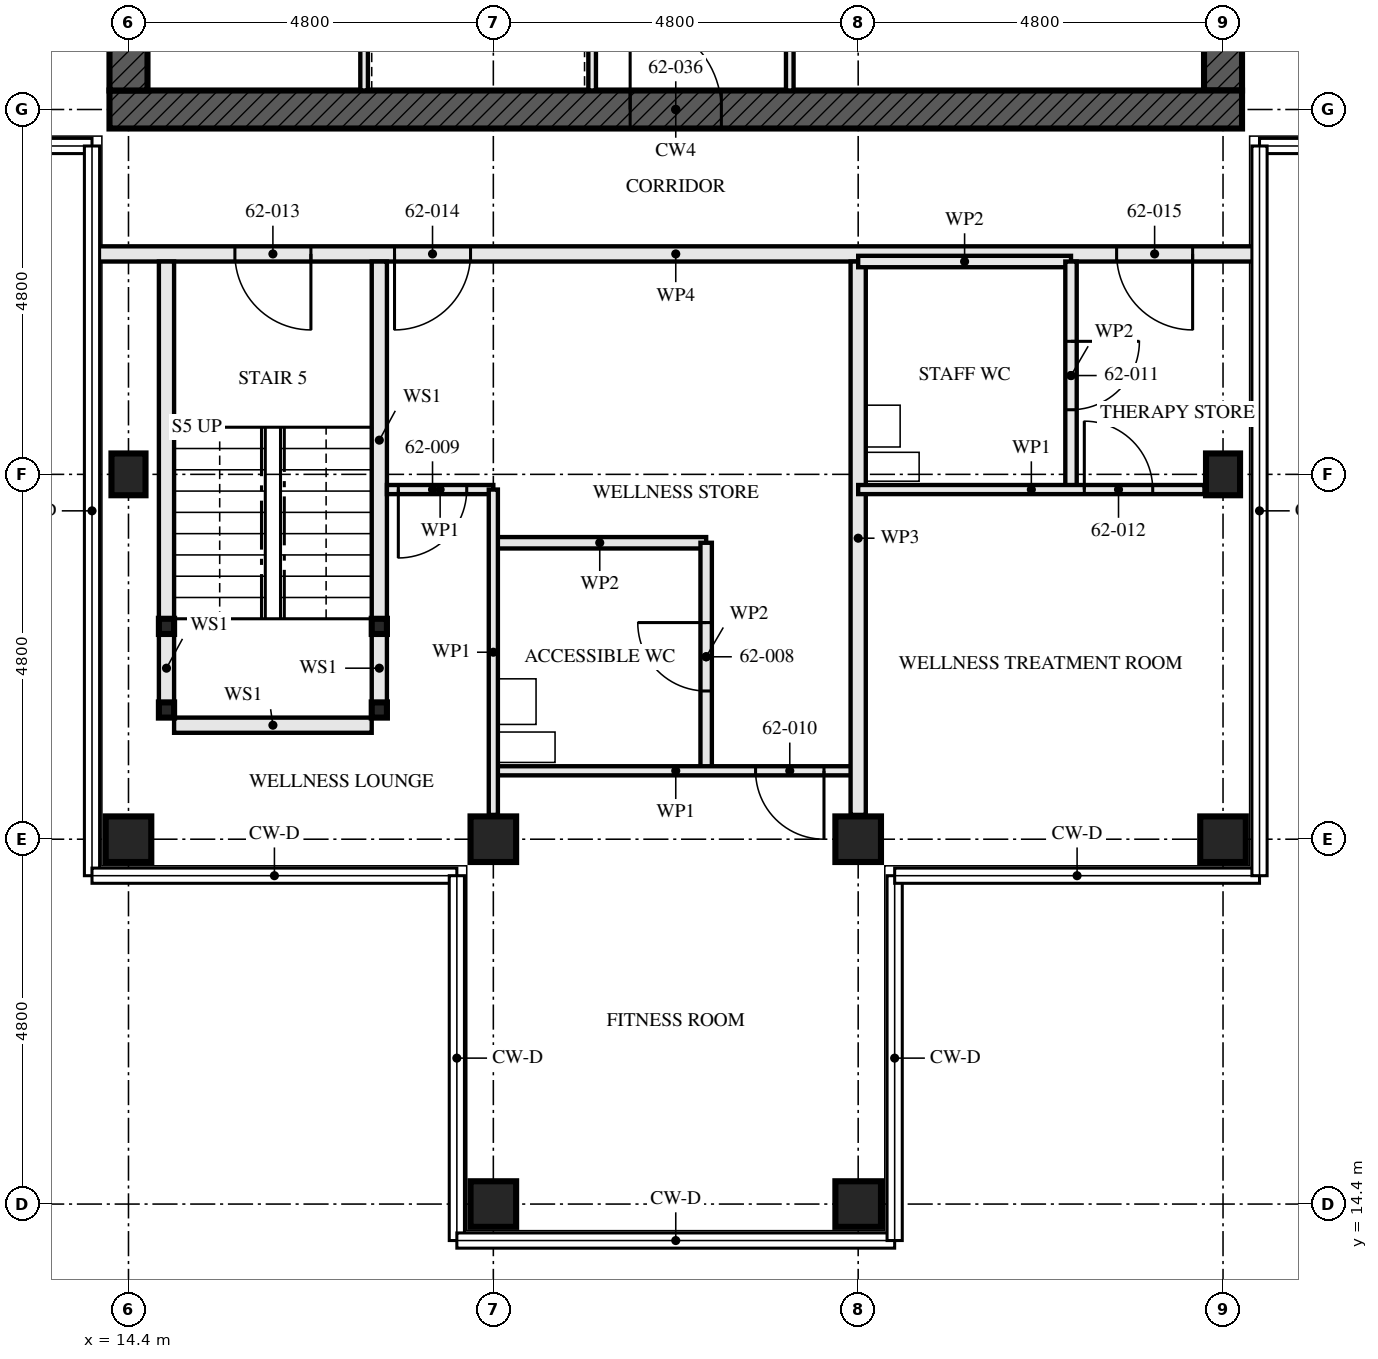
"""IFC4 building model, lengths in metres.
Left out: names, types, materials, properties, quantities, classifications, styles, units other than length and angle.
Written with IfcOpenShell. Run it as: python <this file> out.ifc"""

import sys

from ifc_helpers import new_model, si_unit, direction, frame, frame_2d, origin, origin_2d, place, context, subcontext, project, spatial, rectangle, hollow_rectangle, i_section, extrude, element, fill, save


model = new_model("IFC4")
c1 = context("Model", 3, precision=1e-05, world=origin(), true_north=direction((0.0, 1.0)))
c2 = subcontext(c1, "Body", "Model", "MODEL_VIEW")
j1 = project(units=[si_unit("LENGTHUNIT", "METRE"), si_unit("PLANEANGLEUNIT", "RADIAN")], contexts=[c1])
p1 = place(None, origin())
s1 = spatial("IfcSite", under=j1, at=p1, CompositionType="ELEMENT")
p2 = place(p1, origin())
s2 = spatial("IfcBuilding", under=s1, at=p2, CompositionType="ELEMENT")
p3 = place(p2, frame((0.0, 0.0, 226.0)))
s3 = spatial("IfcBuildingStorey", under=s2, at=p3, CompositionType="ELEMENT", Elevation=226.0)
p4 = place(p3, frame((14.4, 19.2, 0.0), z_axis=(0.0, 0.0, 1.0), x_axis=(0.0, 1.0, 0.0)))
e1 = element("IfcColumn", 1, at=p4, inside=s3, PredefinedType="COLUMN", context=c2, shape_type="SweptSolid", body=[
    extrude(hollow_rectangle(XDim=0.6, YDim=0.6, WallThickness=0.05, at=origin_2d()), origin(), (0.0, 0.0, 1.0), 3.5),
])
p5 = place(p3, frame((14.4, 24.0, 0.0), z_axis=(0.0, 0.0, 1.0), x_axis=(1.0, 0.0, 0.0)))
e2 = element("IfcColumn", 2, at=p5, inside=s3, PredefinedType="COLUMN", context=c2, shape_type="SweptSolid", body=[
    extrude(i_section(OverallWidth=0.448, OverallDepth=0.55, WebThickness=0.072, FlangeThickness=0.115, FilletRadius=0.015, at=origin_2d()), origin(), (0.0, 0.0, 1.0), 3.5),
])
for number, where, z_axis, x_axis in (
    (3, (19.2, 14.4, 0.0), (0.0, 0.0, 1.0), (0.0, 1.0, 0.0)),
    (4, (19.2, 19.2, 0.0), (0.0, 0.0, 1.0), (0.0, 1.0, 0.0)),
    (5, (24.0, 14.4, 0.0), (0.0, 0.0, 1.0), (0.0, 1.0, 0.0)),
    (6, (24.0, 19.2, 0.0), (0.0, 0.0, 1.0), (0.0, 1.0, 0.0)),
    (7, (28.8, 19.2, 0.0), (0.0, 0.0, 1.0), (0.0, 1.0, 0.0)),
):
    element("IfcColumn", number, at=place(p3, frame(where, z_axis=z_axis, x_axis=x_axis)), inside=s3, PredefinedType="COLUMN", context=c2, shape_type="SweptSolid", body=[
        extrude(hollow_rectangle(XDim=0.6, YDim=0.6, WallThickness=0.05, at=origin_2d()), origin(), (0.0, 0.0, 1.0), 3.5),
    ])
p6 = place(p3, frame((28.8, 24.0, 0.0), z_axis=(0.0, 0.0, 1.0), x_axis=(1.0, 0.0, 0.0)))
e8 = element("IfcColumn", 8, at=p6, inside=s3, PredefinedType="COLUMN", context=c2, shape_type="SweptSolid", body=[
    extrude(i_section(OverallWidth=0.448, OverallDepth=0.55, WebThickness=0.072, FlangeThickness=0.115, FilletRadius=0.015, at=origin_2d()), origin(), (0.0, 0.0, 1.0), 3.5),
])
p7 = place(p3, frame((14.15, 28.8, -0.17), z_axis=(0.0, 0.0, 1.0), x_axis=(1.0, 0.0, 0.0)))
e9 = element("IfcWall", 9, at=p7, inside=s3, PredefinedType="SHEAR", context=c2, shape_type="SweptSolid", body=[
    extrude(rectangle(XDim=14.9, YDim=0.5, at=frame_2d((7.45, 0.0))), origin(), (0.0, 0.0, 1.0), 3.5),
])
p8 = place(p7, frame((6.85, 0.0, 0.17)))
e10 = element("IfcOpeningElement", 10, at=p8, cuts=e9, PredefinedType="OPENING", context=c2, shape_type="SweptSolid", body=[
    extrude(rectangle(XDim=1.2, YDim=2.1, at=frame_2d((0.6, 1.05))), frame((0.0, 0.26, 0.0), z_axis=(0.0, -1.0, 0.0), x_axis=(1.0, 0.0, 0.0)), (0.0, 0.0, 1.0), 0.521),
])
p9 = place(p3, frame((14.4, 42.95, -0.17), z_axis=(0.0, 0.0, 1.0), x_axis=(0.0, -1.0, 0.0)))
e11 = element("IfcWall", 11, at=p9, inside=s3, PredefinedType="SHEAR", context=c2, shape_type="SweptSolid", body=[
    extrude(rectangle(XDim=13.9, YDim=0.5, at=frame_2d((6.95, 0.0))), origin(), (0.0, 0.0, 1.0), 3.5),
])
p10 = place(p9, frame((6.35, 0.0, 0.17)))
e12 = element("IfcOpeningElement", 12, at=p10, cuts=e11, PredefinedType="OPENING", context=c2, shape_type="SweptSolid", body=[
    extrude(rectangle(XDim=1.2, YDim=2.1, at=frame_2d((0.6, 1.05))), frame((0.0, 0.26, 0.0), z_axis=(0.0, -1.0, 0.0), x_axis=(1.0, 0.0, 0.0)), (0.0, 0.0, 1.0), 0.521),
])
p11 = place(p3, frame((28.8, 29.05, -0.17), z_axis=(0.0, 0.0, 1.0), x_axis=(0.0, 1.0, 0.0)))
e13 = element("IfcWall", 13, at=p11, inside=s3, PredefinedType="SHEAR", context=c2, shape_type="SweptSolid", body=[
    extrude(rectangle(XDim=13.9, YDim=0.5, at=frame_2d((6.95, 0.0))), origin(), (0.0, 0.0, 1.0), 3.5),
])
p12 = place(p11, frame((6.35, 0.0, 0.17)))
e14 = element("IfcOpeningElement", 14, at=p12, cuts=e13, PredefinedType="OPENING", context=c2, shape_type="SweptSolid", body=[
    extrude(rectangle(XDim=1.2, YDim=2.1, at=frame_2d((0.6, 1.05))), frame((0.0, 0.26, 0.0), z_axis=(0.0, -1.0, 0.0), x_axis=(1.0, 0.0, 0.0)), (0.0, 0.0, 1.0), 0.521),
])
for number, where, z_axis, x_axis in (
    (15, (14.9, 20.9, 0.0), (0.0, 0.0, 1.0), (1.0, 0.0, 0.0)),
    (16, (17.7, 20.9, 0.0), (0.0, 0.0, 1.0), (1.0, 0.0, 0.0)),
    (17, (14.9, 22.0, 0.0), (0.0, 0.0, 1.0), (1.0, 0.0, 0.0)),
    (18, (17.7, 22.0, 0.0), (0.0, 0.0, 1.0), (1.0, 0.0, 0.0)),
):
    element("IfcColumn", number, at=place(p3, frame(where, z_axis=z_axis, x_axis=x_axis)), inside=s3, PredefinedType="COLUMN", context=c2, shape_type="SweptSolid", body=[
        extrude(hollow_rectangle(XDim=0.2, YDim=0.2, WallThickness=0.008, at=origin_2d()), origin(), (0.0, 0.0, 1.0), 3.33),
    ])
p13 = place(p3, frame((14.9, 21.0, 0.0), z_axis=(0.0, 0.0, 1.0), x_axis=(0.0, 1.0, 0.0)))
e19 = element("IfcWall", 19, at=p13, inside=s3, PredefinedType="SOLIDWALL", context=c2, shape_type="SweptSolid", body=[
    extrude(rectangle(XDim=0.9, YDim=0.2, at=frame_2d((0.45, 0.0))), origin(), (0.0, 0.0, 1.0), 2.99),
])
p14 = place(p3, frame((14.9, 22.1, 0.0), z_axis=(0.0, 0.0, 1.0), x_axis=(0.0, 1.0, 0.0)))
e20 = element("IfcWall", 20, at=p14, inside=s3, PredefinedType="SOLIDWALL", context=c2, shape_type="SweptSolid", body=[
    extrude(rectangle(XDim=4.7, YDim=0.2, at=frame_2d((2.35, 0.0))), origin(), (0.0, 0.0, 1.0), 2.99),
])
p15 = place(p3, frame((17.7, 21.0, 0.0), z_axis=(0.0, 0.0, 1.0), x_axis=(0.0, 1.0, 0.0)))
e21 = element("IfcWall", 21, at=p15, inside=s3, PredefinedType="SOLIDWALL", context=c2, shape_type="SweptSolid", body=[
    extrude(rectangle(XDim=0.9, YDim=0.2, at=frame_2d((0.45, 0.0))), origin(), (0.0, 0.0, 1.0), 2.99),
])
p16 = place(p3, frame((17.7, 22.1, 0.0), z_axis=(0.0, 0.0, 1.0), x_axis=(0.0, 1.0, 0.0)))
e22 = element("IfcWall", 22, at=p16, inside=s3, PredefinedType="SOLIDWALL", context=c2, shape_type="SweptSolid", body=[
    extrude(rectangle(XDim=4.7, YDim=0.2, at=frame_2d((2.35, 0.0))), origin(), (0.0, 0.0, 1.0), 2.99),
])
p17 = place(p3, frame((15.0, 20.7, 0.0), z_axis=(0.0, 0.0, 1.0), x_axis=(1.0, 0.0, 0.0)))
e23 = element("IfcWall", 23, at=p17, inside=s3, PredefinedType="SOLIDWALL", context=c2, shape_type="SweptSolid", body=[
    extrude(rectangle(XDim=2.6, YDim=0.2, at=frame_2d((1.3, 0.0))), origin(), (0.0, 0.0, 1.0), 3.33),
])
p18 = place(p3, frame((22.0, 20.1, 0.0), z_axis=(0.0, 0.0, 1.0), x_axis=(0.0, 1.0, 0.0)))
e24 = element("IfcWall", 24, at=p18, inside=s3, PredefinedType="PARTITIONING", context=c2, shape_type="SweptSolid", body=[
    extrude(rectangle(XDim=3.0, YDim=0.15, at=frame_2d((1.5, 0.0))), origin(), (0.0, 0.0, 1.0), 3.33),
])
p19 = place(p18, frame((1.05, 0.0, 0.0)))
e25 = element("IfcOpeningElement", 25, at=p19, cuts=e24, PredefinedType="OPENING", context=c2, shape_type="SweptSolid", body=[
    extrude(rectangle(XDim=0.9, YDim=2.1, at=frame_2d((0.45, 1.05))), frame((0.0, 0.085, 0.0), z_axis=(0.0, -1.0, 0.0), x_axis=(1.0, 0.0, 0.0)), (0.0, 0.0, 1.0), 0.171),
])
p20 = place(p3, frame((19.2, 23.1, 0.0), z_axis=(0.0, 0.0, 1.0), x_axis=(1.0, 0.0, 0.0)))
e26 = element("IfcWall", 26, at=p20, inside=s3, PredefinedType="PARTITIONING", context=c2, shape_type="SweptSolid", body=[
    extrude(rectangle(XDim=2.8, YDim=0.15, at=frame_2d((1.4, 0.0))), origin(), (0.0, 0.0, 1.0), 3.33),
])
p21 = place(p3, frame((17.8, 23.8, 0.0), z_axis=(0.0, 0.0, 1.0), x_axis=(1.0, 0.0, 0.0)))
e27 = element("IfcWall", 27, at=p21, inside=s3, PredefinedType="PARTITIONING", context=c2, shape_type="SweptSolid", body=[
    extrude(rectangle(XDim=1.4, YDim=0.12, at=frame_2d((0.7, 0.0))), origin(), (0.0, 0.0, 1.0), 3.33),
])
p22 = place(p21, frame((0.15, 0.0, 0.0)))
e28 = element("IfcOpeningElement", 28, at=p22, cuts=e27, PredefinedType="OPENING", context=c2, shape_type="SweptSolid", body=[
    extrude(rectangle(XDim=0.9, YDim=2.1, at=frame_2d((0.45, 1.05))), frame((0.0, 0.071, 0.0), z_axis=(0.0, -1.0, 0.0), x_axis=(1.0, 0.0, 0.0)), (0.0, 0.0, 1.0), 0.141),
])
p23 = place(p3, frame((19.2, 20.1, 0.0), z_axis=(0.0, 0.0, 1.0), x_axis=(1.0, 0.0, 0.0)))
e29 = element("IfcWall", 29, at=p23, inside=s3, PredefinedType="PARTITIONING", context=c2, shape_type="SweptSolid", body=[
    extrude(rectangle(XDim=4.8, YDim=0.12, at=frame_2d((2.4, 0.0))), origin(), (0.0, 0.0, 1.0), 3.33),
])
p24 = place(p23, frame((3.45, 0.0, 0.0)))
e30 = element("IfcOpeningElement", 30, at=p24, cuts=e29, PredefinedType="OPENING", context=c2, shape_type="SweptSolid", body=[
    extrude(rectangle(XDim=0.9, YDim=2.1, at=frame_2d((0.45, 1.05))), frame((0.0, 0.071, 0.0), z_axis=(0.0, -1.0, 0.0), x_axis=(1.0, 0.0, 0.0)), (0.0, 0.0, 1.0), 0.141),
])
p25 = place(p3, frame((19.2, 19.52, 0.0), z_axis=(0.0, 0.0, 1.0), x_axis=(0.0, 1.0, 0.0)))
e31 = element("IfcWall", 31, at=p25, inside=s3, PredefinedType="PARTITIONING", context=c2, shape_type="SweptSolid", body=[
    extrude(rectangle(XDim=4.28, YDim=0.12, at=frame_2d((2.14, 0.0))), origin(), (0.0, 0.0, 1.0), 2.55),
])
p26 = place(p3, frame((24.0, 19.52, 0.0), z_axis=(0.0, 0.0, 1.0), x_axis=(0.0, 1.0, 0.0)))
e32 = element("IfcWall", 32, at=p26, inside=s3, PredefinedType="PARTITIONING", context=c2, shape_type="SweptSolid", body=[
    extrude(rectangle(XDim=7.28, YDim=0.2, at=frame_2d((3.64, 0.0))), origin(), (0.0, 0.0, 1.0), 2.55),
])
p27 = place(p3, frame((26.8, 23.8, 0.0), z_axis=(0.0, 0.0, 1.0), x_axis=(0.0, 1.0, 0.0)))
e33 = element("IfcWall", 33, at=p27, inside=s3, PredefinedType="PARTITIONING", context=c2, shape_type="SweptSolid", body=[
    extrude(rectangle(XDim=3.0, YDim=0.15, at=frame_2d((1.5, 0.0))), origin(), (0.0, 0.0, 1.0), 2.55),
])
p28 = place(p27, frame((1.05, 0.0, 0.0)))
e34 = element("IfcOpeningElement", 34, at=p28, cuts=e33, PredefinedType="OPENING", context=c2, shape_type="SweptSolid", body=[
    extrude(rectangle(XDim=0.9, YDim=2.1, at=frame_2d((0.45, 1.05))), frame((0.0, 0.085, 0.0), z_axis=(0.0, -1.0, 0.0), x_axis=(1.0, 0.0, 0.0)), (0.0, 0.0, 1.0), 0.171),
])
p29 = place(p3, frame((24.0, 26.8, 0.0), z_axis=(0.0, 0.0, 1.0), x_axis=(1.0, 0.0, 0.0)))
e35 = element("IfcWall", 35, at=p29, inside=s3, PredefinedType="PARTITIONING", context=c2, shape_type="SweptSolid", body=[
    extrude(rectangle(XDim=2.8, YDim=0.15, at=frame_2d((1.4, 0.0))), origin(), (0.0, 0.0, 1.0), 3.33),
])
p30 = place(p3, frame((24.0, 23.8, 0.0), z_axis=(0.0, 0.0, 1.0), x_axis=(1.0, 0.0, 0.0)))
e36 = element("IfcWall", 36, at=p30, inside=s3, PredefinedType="PARTITIONING", context=c2, shape_type="SweptSolid", body=[
    extrude(rectangle(XDim=4.556, YDim=0.12, at=frame_2d((2.278, 0.0))), origin(), (0.0, 0.0, 1.0), 3.33),
])
p31 = place(p30, frame((2.975, 0.0, 0.0)))
e37 = element("IfcOpeningElement", 37, at=p31, cuts=e36, PredefinedType="OPENING", context=c2, shape_type="SweptSolid", body=[
    extrude(rectangle(XDim=0.9, YDim=2.1, at=frame_2d((0.45, 1.05))), frame((0.0, 0.071, 0.0), z_axis=(0.0, -1.0, 0.0), x_axis=(1.0, 0.0, 0.0)), (0.0, 0.0, 1.0), 0.141),
])
p32 = place(p3, frame((13.945, 26.9, 0.0), z_axis=(0.0, 0.0, 1.0), x_axis=(1.0, 0.0, 0.0)))
e38 = element("IfcWall", 38, at=p32, inside=s3, PredefinedType="PARTITIONING", context=c2, shape_type="SweptSolid", body=[
    extrude(rectangle(XDim=15.31, YDim=0.2, at=frame_2d((7.655, 0.0))), origin(), (0.0, 0.0, 1.0), 2.32),
])
p33 = place(p32, frame((1.855, 0.0, 0.0)))
e39 = element("IfcOpeningElement", 39, at=p33, cuts=e38, PredefinedType="OPENING", context=c2, shape_type="SweptSolid", body=[
    extrude(rectangle(XDim=1.0, YDim=2.1, at=frame_2d((0.5, 1.05))), frame((0.0, 0.111, 0.0), z_axis=(0.0, -1.0, 0.0), x_axis=(1.0, 0.0, 0.0)), (0.0, 0.0, 1.0), 0.221),
])
p34 = place(p32, frame((3.955, 0.0, 0.0)))
e40 = element("IfcOpeningElement", 40, at=p34, cuts=e38, PredefinedType="OPENING", context=c2, shape_type="SweptSolid", body=[
    extrude(rectangle(XDim=1.0, YDim=2.1, at=frame_2d((0.5, 1.05))), frame((0.0, 0.111, 0.0), z_axis=(0.0, -1.0, 0.0), x_axis=(1.0, 0.0, 0.0)), (0.0, 0.0, 1.0), 0.221),
])
p35 = place(p32, frame((13.455, 0.0, 0.0)))
e41 = element("IfcOpeningElement", 41, at=p35, cuts=e38, PredefinedType="OPENING", context=c2, shape_type="SweptSolid", body=[
    extrude(rectangle(XDim=1.0, YDim=2.1, at=frame_2d((0.5, 1.05))), frame((0.0, 0.111, 0.0), z_axis=(0.0, -1.0, 0.0), x_axis=(1.0, 0.0, 0.0)), (0.0, 0.0, 1.0), 0.221),
])
p36 = place(p3, frame((20.5, 29.05, 0.0), z_axis=(0.0, 0.0, 1.0), x_axis=(0.0, 1.0, 0.0)))
e42 = element("IfcWall", 42, at=p36, inside=s3, PredefinedType="SOLIDWALL", context=c2, shape_type="SweptSolid", body=[
    extrude(rectangle(XDim=5.8, YDim=0.1, at=frame_2d((2.9, 0.0))), origin(), (0.0, 0.0, 1.0), 3.33),
])
p37 = place(p36, frame((0.8, 0.0, 0.0)))
e43 = element("IfcOpeningElement", 43, at=p37, cuts=e42, PredefinedType="OPENING", context=c2, shape_type="SweptSolid", body=[
    extrude(rectangle(XDim=1.1, YDim=2.3, at=frame_2d((0.55, 1.15))), frame((0.0, 0.061, 0.0), z_axis=(0.0, -1.0, 0.0), x_axis=(1.0, 0.0, 0.0)), (0.0, 0.0, 1.0), 0.121),
])
p38 = place(p36, frame((3.775, 0.0, 0.0)))
e44 = element("IfcOpeningElement", 44, at=p38, cuts=e42, PredefinedType="OPENING", context=c2, shape_type="SweptSolid", body=[
    extrude(rectangle(XDim=1.1, YDim=2.3, at=frame_2d((0.55, 1.15))), frame((0.0, 0.061, 0.0), z_axis=(0.0, -1.0, 0.0), x_axis=(1.0, 0.0, 0.0)), (0.0, 0.0, 1.0), 0.121),
])
p39 = place(p3, frame((23.1, 29.05, 0.0), z_axis=(0.0, 0.0, 1.0), x_axis=(0.0, 1.0, 0.0)))
e45 = element("IfcWall", 45, at=p39, inside=s3, PredefinedType="SOLIDWALL", context=c2, shape_type="SweptSolid", body=[
    extrude(rectangle(XDim=5.8, YDim=0.1, at=frame_2d((2.9, 0.0))), origin(), (0.0, 0.0, 1.0), 3.33),
])
p40 = place(p39, frame((1.0, 0.0, 0.0)))
e46 = element("IfcOpeningElement", 46, at=p40, cuts=e45, PredefinedType="OPENING", context=c2, shape_type="SweptSolid", body=[
    extrude(rectangle(XDim=0.7, YDim=2.1, at=frame_2d((0.35, 1.05))), frame((0.0, 0.061, 0.0), z_axis=(0.0, -1.0, 0.0), x_axis=(1.0, 0.0, 0.0)), (0.0, 0.0, 1.0), 0.121),
])
p41 = place(p3, frame((17.5, 29.05, 0.0), z_axis=(0.0, 0.0, 1.0), x_axis=(0.0, 1.0, 0.0)))
e47 = element("IfcWall", 47, at=p41, inside=s3, PredefinedType="SOLIDWALL", context=c2, shape_type="SweptSolid", body=[
    extrude(rectangle(XDim=5.8, YDim=0.1, at=frame_2d((2.9, 0.0))), origin(), (0.0, 0.0, 1.0), 3.33),
])
p42 = place(p19, origin())
e48 = element("IfcDoor", 48, at=p42, inside=s3, OperationType="SINGLE_SWING_LEFT", PredefinedType="DOOR", context=c2, shape_type="SweptSolid", body=[
    extrude(rectangle(XDim=0.9, YDim=2.1, at=frame_2d((0.45, 1.05))), frame((0.0, 0.022, 0.0), z_axis=(0.0, -1.0, 0.0), x_axis=(1.0, 0.0, 0.0)), (0.0, 0.0, 1.0), 0.044),
])
fill(e25, e48)
p43 = place(p22, frame((0.9, 0.0, 0.0), z_axis=(0.0, 0.0, 1.0), x_axis=(-1.0, 0.0, 0.0)))
e49 = element("IfcDoor", 49, at=p43, inside=s3, OperationType="SINGLE_SWING_LEFT", PredefinedType="DOOR", context=c2, shape_type="SweptSolid", body=[
    extrude(rectangle(XDim=0.9, YDim=2.1, at=frame_2d((0.45, 1.05))), frame((0.0, 0.022, 0.0), z_axis=(0.0, -1.0, 0.0), x_axis=(1.0, 0.0, 0.0)), (0.0, 0.0, 1.0), 0.044),
])
fill(e28, e49)
p44 = place(p24, frame((0.9, 0.0, 0.0), z_axis=(0.0, 0.0, 1.0), x_axis=(-1.0, 0.0, 0.0)))
e50 = element("IfcDoor", 50, at=p44, inside=s3, OperationType="SINGLE_SWING_RIGHT", PredefinedType="DOOR", context=c2, shape_type="SweptSolid", body=[
    extrude(rectangle(XDim=0.9, YDim=2.1, at=frame_2d((0.45, 1.05))), frame((0.0, 0.022, 0.0), z_axis=(0.0, -1.0, 0.0), x_axis=(1.0, 0.0, 0.0)), (0.0, 0.0, 1.0), 0.044),
])
fill(e30, e50)
p45 = place(p28, frame((0.9, 0.0, 0.0), z_axis=(0.0, 0.0, 1.0), x_axis=(-1.0, 0.0, 0.0)))
e51 = element("IfcDoor", 51, at=p45, inside=s3, OperationType="SINGLE_SWING_RIGHT", PredefinedType="DOOR", context=c2, shape_type="SweptSolid", body=[
    extrude(rectangle(XDim=0.9, YDim=2.1, at=frame_2d((0.45, 1.05))), frame((0.0, 0.022, 0.0), z_axis=(0.0, -1.0, 0.0), x_axis=(1.0, 0.0, 0.0)), (0.0, 0.0, 1.0), 0.044),
])
fill(e34, e51)
p46 = place(p31, origin())
e52 = element("IfcDoor", 52, at=p46, inside=s3, OperationType="SINGLE_SWING_RIGHT", PredefinedType="DOOR", context=c2, shape_type="SweptSolid", body=[
    extrude(rectangle(XDim=0.9, YDim=2.1, at=frame_2d((0.45, 1.05))), frame((0.0, 0.022, 0.0), z_axis=(0.0, -1.0, 0.0), x_axis=(1.0, 0.0, 0.0)), (0.0, 0.0, 1.0), 0.044),
])
fill(e37, e52)
p47 = place(p33, frame((1.0, 0.0, 0.0), z_axis=(0.0, 0.0, 1.0), x_axis=(-1.0, 0.0, 0.0)))
e53 = element("IfcDoor", 53, at=p47, inside=s3, OperationType="SINGLE_SWING_RIGHT", PredefinedType="DOOR", context=c2, shape_type="SweptSolid", body=[
    extrude(rectangle(XDim=1.0, YDim=2.1, at=frame_2d((0.5, 1.05))), frame((0.0, 0.032, 0.0), z_axis=(0.0, -1.0, 0.0), x_axis=(1.0, 0.0, 0.0)), (0.0, 0.0, 1.0), 0.064),
])
fill(e39, e53)
p48 = place(p34, frame((1.0, 0.0, 0.0), z_axis=(0.0, 0.0, 1.0), x_axis=(-1.0, 0.0, 0.0)))
e54 = element("IfcDoor", 54, at=p48, inside=s3, OperationType="SINGLE_SWING_LEFT", PredefinedType="DOOR", context=c2, shape_type="SweptSolid", body=[
    extrude(rectangle(XDim=1.0, YDim=2.1, at=frame_2d((0.5, 1.05))), frame((0.0, 0.027, 0.0), z_axis=(0.0, -1.0, 0.0), x_axis=(1.0, 0.0, 0.0)), (0.0, 0.0, 1.0), 0.054),
])
fill(e40, e54)
p49 = place(p35, frame((1.0, 0.0, 0.0), z_axis=(0.0, 0.0, 1.0), x_axis=(-1.0, 0.0, 0.0)))
e55 = element("IfcDoor", 55, at=p49, inside=s3, OperationType="SINGLE_SWING_RIGHT", PredefinedType="DOOR", context=c2, shape_type="SweptSolid", body=[
    extrude(rectangle(XDim=1.0, YDim=2.1, at=frame_2d((0.5, 1.05))), frame((0.0, 0.027, 0.0), z_axis=(0.0, -1.0, 0.0), x_axis=(1.0, 0.0, 0.0)), (0.0, 0.0, 1.0), 0.054),
])
fill(e41, e55)
p50 = place(p8, origin())
e56 = element("IfcDoor", 56, at=p50, inside=s3, OperationType="SINGLE_SWING_LEFT", PredefinedType="DOOR", context=c2, shape_type="SweptSolid", body=[
    extrude(rectangle(XDim=1.2, YDim=2.1, at=frame_2d((0.6, 1.05))), frame((0.0, 0.027, 0.0), z_axis=(0.0, -1.0, 0.0), x_axis=(1.0, 0.0, 0.0)), (0.0, 0.0, 1.0), 0.054),
])
fill(e10, e56)
save(model, sys.argv[1])
